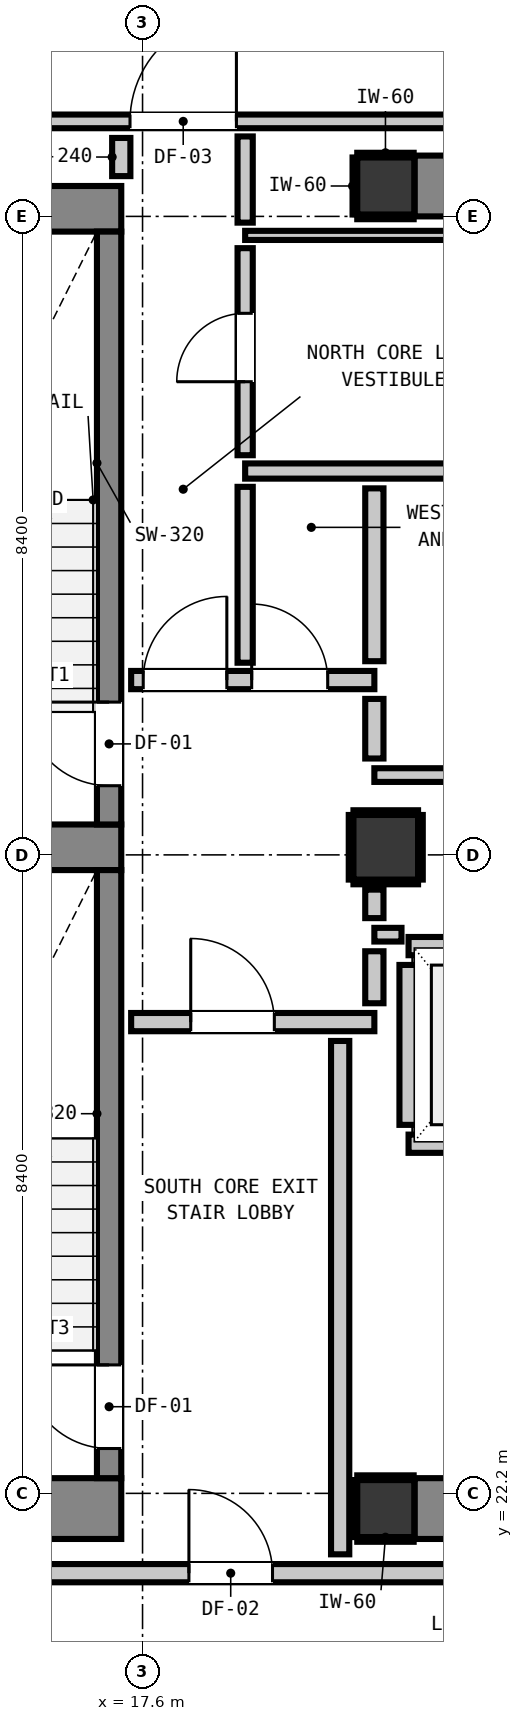
"""IFC4 building model, lengths in metres.
Left out: names, types, materials, properties, quantities, classifications, styles, units other than length and angle.
Written with IfcOpenShell. Run it as: python <this file> out.ifc"""

import sys

from ifc_helpers import new_model, si_unit, direction, frame, frame_2d, origin, origin_2d, place, context, subcontext, project, spatial, rectangle, extrude, element, fill, save


model = new_model("IFC4")
c1 = context("Model", 3, precision=1e-05, world=origin(), true_north=direction((0.0, 1.0)))
c2 = subcontext(c1, "Body", "Model", "MODEL_VIEW")
j1 = project(units=[si_unit("LENGTHUNIT", "METRE"), si_unit("PLANEANGLEUNIT", "RADIAN")], contexts=[c1])
p1 = place(None, origin())
s1 = spatial("IfcSite", under=j1, at=p1, CompositionType="ELEMENT")
p2 = place(p1, origin())
s2 = spatial("IfcBuilding", under=s1, at=p2, CompositionType="ELEMENT")
p3 = place(p2, frame((0.0, 0.0, 206.76)))
s3 = spatial("IfcBuildingStorey", under=s2, at=p3, CompositionType="ELEMENT", Elevation=206.76)
for number, where, z_axis, x_axis in (
    (1, (20.8, 22.0, 0.0), (0.0, 0.0, 1.0), (1.0, 0.0, 0.0)),
    (2, (20.8, 39.4, 0.0), (0.0, 0.0, 1.0), (1.0, 0.0, 0.0)),
):
    element("IfcColumn", number, at=place(p3, frame(where, z_axis=z_axis, x_axis=x_axis)), inside=s3, PredefinedType="COLUMN", context=c2, shape_type="SweptSolid", body=[
        extrude(rectangle(XDim=0.75, YDim=0.75, at=origin_2d()), origin(), (0.0, 0.0, 1.0), 3.32),
    ])
p4 = place(p3, frame((13.24, 22.0, 0.0), z_axis=(0.0, 0.0, 1.0), x_axis=(1.0, 0.0, 0.0)))
e3 = element("IfcWall", 3, at=p4, inside=s3, PredefinedType="SHEAR", context=c2, shape_type="SweptSolid", body=[
    extrude(rectangle(XDim=4.08, YDim=0.8, at=frame_2d((2.04, 0.0))), origin(), (0.0, 0.0, 1.0), 3.32),
])
p5 = place(p3, frame((13.24, 39.1, 0.0), z_axis=(0.0, 0.0, 1.0), x_axis=(1.0, 0.0, 0.0)))
e4 = element("IfcWall", 4, at=p5, inside=s3, PredefinedType="SHEAR", context=c2, shape_type="SweptSolid", body=[
    extrude(rectangle(XDim=4.08, YDim=0.6, at=frame_2d((2.04, 0.0))), origin(), (0.0, 0.0, 1.0), 3.32),
])
p6 = place(p3, frame((13.78, 30.7, 0.0), z_axis=(0.0, 0.0, 1.0), x_axis=(1.0, 0.0, 0.0)))
e5 = element("IfcWall", 5, at=p6, inside=s3, PredefinedType="SHEAR", context=c2, shape_type="SweptSolid", body=[
    extrude(rectangle(XDim=3.54, YDim=0.6, at=frame_2d((1.77, 0.0))), origin(), (0.0, 0.0, 1.0), 3.32),
])
for number, where, z_axis, x_axis in (
    (6, (21.18, 22.0, 0.0), (0.0, 0.0, 1.0), (1.0, 0.0, 0.0)),
    (7, (21.18, 39.4, 0.0), (0.0, 0.0, 1.0), (1.0, 0.0, 0.0)),
):
    element("IfcWall", number, at=place(p3, frame(where, z_axis=z_axis, x_axis=x_axis)), inside=s3, PredefinedType="SHEAR", context=c2, shape_type="SweptSolid", body=[
        extrude(rectangle(XDim=7.64, YDim=0.8, at=frame_2d((3.82, 0.0))), origin(), (0.0, 0.0, 1.0), 3.32),
    ])
p7 = place(p3, frame((17.16, 31.0, 0.0), z_axis=(0.0, 0.0, 1.0), x_axis=(0.0, 1.0, 0.0)))
e8 = element("IfcWall", 8, at=p7, inside=s3, PredefinedType="SHEAR", context=c2, shape_type="SweptSolid", body=[
    extrude(rectangle(XDim=7.8, YDim=0.32, at=frame_2d((3.9, 0.0))), origin(), (0.0, 0.0, 1.0), 3.32),
])
p8 = place(p7, frame((0.51, 0.0, 0.0)))
e9 = element("IfcOpeningElement", 9, at=p8, cuts=e8, PredefinedType="OPENING", context=c2, shape_type="SweptSolid", body=[
    extrude(rectangle(XDim=1.1, YDim=2.15, at=frame_2d((0.55, 1.075))), frame((0.0, 0.17, 0.0), z_axis=(0.0, -1.0, 0.0), x_axis=(1.0, 0.0, 0.0)), (0.0, 0.0, 1.0), 0.34),
])
p9 = place(p3, frame((17.16, 22.4, 0.0), z_axis=(0.0, 0.0, 1.0), x_axis=(0.0, 1.0, 0.0)))
e10 = element("IfcWall", 10, at=p9, inside=s3, PredefinedType="SHEAR", context=c2, shape_type="SweptSolid", body=[
    extrude(rectangle(XDim=8.0, YDim=0.32, at=frame_2d((4.0, 0.0))), origin(), (0.0, 0.0, 1.0), 3.32),
])
p10 = place(p9, frame((0.39, 0.0, 0.0)))
e11 = element("IfcOpeningElement", 11, at=p10, cuts=e10, PredefinedType="OPENING", context=c2, shape_type="SweptSolid", body=[
    extrude(rectangle(XDim=1.1, YDim=2.15, at=frame_2d((0.55, 1.075))), frame((0.0, 0.17, 0.0), z_axis=(0.0, -1.0, 0.0), x_axis=(1.0, 0.0, 0.0)), (0.0, 0.0, 1.0), 0.34),
])
p11 = place(p3, frame((20.8, 30.7, 0.0), z_axis=(0.0, 0.0, 1.0), x_axis=(1.0, 0.0, 0.0)))
e12 = element("IfcColumn", 12, at=p11, inside=s3, PredefinedType="COLUMN", context=c2, shape_type="SweptSolid", body=[
    extrude(rectangle(XDim=0.85, YDim=0.85, at=origin_2d()), origin(), (0.0, 0.0, 1.0), 3.32),
])
for number, where, z_axis, x_axis in (
    (13, (21.1, 26.8, 0.0), (0.0, 0.0, 1.0), (1.0, 0.0, 0.0)),
    (14, (21.1, 29.4, 0.0), (0.0, 0.0, 1.0), (1.0, 0.0, 0.0)),
):
    element("IfcWall", number, at=place(p3, frame(where, z_axis=z_axis, x_axis=x_axis)), inside=s3, PredefinedType="PARTITIONING", context=c2, shape_type="SweptSolid", body=[
        extrude(rectangle(XDim=2.2, YDim=0.24, at=frame_2d((1.1, 0.0))), origin(), (0.0, 0.0, 1.0), 2.9),
    ])
p12 = place(p3, frame((21.1, 27.048, 0.0), z_axis=(0.0, 0.0, 1.0), x_axis=(0.0, 1.0, 0.0)))
e15 = element("IfcWall", 15, at=p12, inside=s3, PredefinedType="PARTITIONING", context=c2, shape_type="SweptSolid", body=[
    extrude(rectangle(XDim=2.104, YDim=0.24, at=frame_2d((1.052, 0.0))), origin(), (0.0, 0.0, 1.0), 0.905),
])
p13 = place(p3, frame((4.587, 21.15, 0.0), z_axis=(0.0, 0.0, 1.0), x_axis=(1.0, 0.0, 0.0)))
e16 = element("IfcWall", 16, at=p13, inside=s3, PredefinedType="PARTITIONING", context=c2, shape_type="SweptSolid", body=[
    extrude(rectangle(XDim=36.626, YDim=0.24, at=frame_2d((18.313, 0.0))), origin(), (0.0, 0.0, 1.0), 2.9),
])
p14 = place(p13, frame((13.623, 0.0, 0.0)))
e17 = element("IfcOpeningElement", 17, at=p14, cuts=e16, PredefinedType="OPENING", context=c2, shape_type="SweptSolid", body=[
    extrude(rectangle(XDim=1.1, YDim=2.15, at=frame_2d((0.55, 1.075))), frame((0.0, 0.13, 0.0), z_axis=(0.0, -1.0, 0.0), x_axis=(1.0, 0.0, 0.0)), (0.0, 0.0, 1.0), 0.26),
])
p15 = place(p13, frame((3.362, 0.0, 0.0)))
e18 = element("IfcOpeningElement", 18, at=p15, cuts=e16, PredefinedType="OPENING", context=c2, shape_type="SweptSolid", body=[
    extrude(rectangle(XDim=0.9, YDim=2.1, at=frame_2d((0.45, 1.05))), frame((0.0, 0.13, 0.0), z_axis=(0.0, -1.0, 0.0), x_axis=(1.0, 0.0, 0.0)), (0.0, 0.0, 1.0), 0.26),
])
p16 = place(p3, frame((17.45, 28.4, 0.0), z_axis=(0.0, 0.0, 1.0), x_axis=(1.0, 0.0, 0.0)))
e19 = element("IfcWall", 19, at=p16, inside=s3, PredefinedType="PARTITIONING", context=c2, shape_type="SweptSolid", body=[
    extrude(rectangle(XDim=3.2, YDim=0.24, at=frame_2d((1.6, 0.0))), origin(), (0.0, 0.0, 1.0), 2.9),
])
p17 = place(p16, frame((0.784, 0.0, 0.0)))
e20 = element("IfcOpeningElement", 20, at=p17, cuts=e19, PredefinedType="OPENING", context=c2, shape_type="SweptSolid", body=[
    extrude(rectangle(XDim=1.1, YDim=2.15, at=frame_2d((0.55, 1.075))), frame((0.0, 0.13, 0.0), z_axis=(0.0, -1.0, 0.0), x_axis=(1.0, 0.0, 0.0)), (0.0, 0.0, 1.0), 0.26),
])
p18 = place(p3, frame((17.45, 32.9, 0.0), z_axis=(0.0, 0.0, 1.0), x_axis=(1.0, 0.0, 0.0)))
e21 = element("IfcWall", 21, at=p18, inside=s3, PredefinedType="PARTITIONING", context=c2, shape_type="SweptSolid", body=[
    extrude(rectangle(XDim=3.2, YDim=0.24, at=frame_2d((1.6, 0.0))), origin(), (0.0, 0.0, 1.0), 2.9),
])
p19 = place(p18, frame((0.159, 0.0, 0.0)))
e22 = element("IfcOpeningElement", 22, at=p19, cuts=e21, PredefinedType="OPENING", context=c2, shape_type="SweptSolid", body=[
    extrude(rectangle(XDim=1.1, YDim=2.15, at=frame_2d((0.55, 1.075))), frame((0.0, 0.13, 0.0), z_axis=(0.0, -1.0, 0.0), x_axis=(1.0, 0.0, 0.0)), (0.0, 0.0, 1.0), 0.26),
])
p20 = place(p18, frame((1.586, 0.0, 0.0)))
e23 = element("IfcOpeningElement", 23, at=p20, cuts=e21, PredefinedType="OPENING", context=c2, shape_type="SweptSolid", body=[
    extrude(rectangle(XDim=1.0, YDim=2.15, at=frame_2d((0.5, 1.075))), frame((0.0, 0.13, 0.0), z_axis=(0.0, -1.0, 0.0), x_axis=(1.0, 0.0, 0.0)), (0.0, 0.0, 1.0), 0.26),
])
p21 = place(p3, frame((18.95, 35.65, 0.0), z_axis=(0.0, 0.0, 1.0), x_axis=(1.0, 0.0, 0.0)))
e24 = element("IfcWall", 24, at=p21, inside=s3, PredefinedType="PARTITIONING", context=c2, shape_type="SweptSolid", body=[
    extrude(rectangle(XDim=11.025, YDim=0.2, at=frame_2d((5.513, 0.0))), origin(), (0.0, 0.0, 1.0), 2.9),
])
p22 = place(p3, frame((20.65, 29.55, 0.0), z_axis=(0.0, 0.0, 1.0), x_axis=(1.0, 0.0, 0.0)))
e25 = element("IfcWall", 25, at=p22, inside=s3, PredefinedType="PARTITIONING", context=c2, shape_type="SweptSolid", body=[
    extrude(rectangle(XDim=0.357, YDim=0.18, at=frame_2d((0.179, 0.0))), origin(), (0.0, 0.0, 1.0), 2.9),
])
p23 = place(p3, frame((20.65, 31.65, 0.0), z_axis=(0.0, 0.0, 1.0), x_axis=(1.0, 0.0, 0.0)))
e26 = element("IfcWall", 26, at=p23, inside=s3, PredefinedType="PARTITIONING", context=c2, shape_type="SweptSolid", body=[
    extrude(rectangle(XDim=7.7, YDim=0.18, at=frame_2d((3.85, 0.0))), origin(), (0.0, 0.0, 1.0), 2.9),
])
p24 = place(p23, frame((4.673, 0.0, 0.0)))
e27 = element("IfcOpeningElement", 27, at=p24, cuts=e26, PredefinedType="OPENING", context=c2, shape_type="SweptSolid", body=[
    extrude(rectangle(XDim=0.9, YDim=2.1, at=frame_2d((0.45, 1.05))), frame((0.0, 0.1, 0.0), z_axis=(0.0, -1.0, 0.0), x_axis=(1.0, 0.0, 0.0)), (0.0, 0.0, 1.0), 0.2),
])
p25 = place(p3, frame((4.587, 40.25, 0.0), z_axis=(0.0, 0.0, 1.0), x_axis=(1.0, 0.0, 0.0)))
e28 = element("IfcWall", 28, at=p25, inside=s3, PredefinedType="PARTITIONING", context=c2, shape_type="SweptSolid", body=[
    extrude(rectangle(XDim=36.626, YDim=0.18, at=frame_2d((18.313, 0.0))), origin(), (0.0, 0.0, 1.0), 2.9),
])
p26 = place(p25, frame((12.848, 0.0, 0.0)))
e29 = element("IfcOpeningElement", 29, at=p26, cuts=e28, PredefinedType="OPENING", context=c2, shape_type="SweptSolid", body=[
    extrude(rectangle(XDim=1.4, YDim=2.15, at=frame_2d((0.7, 1.075))), frame((0.0, 0.1, 0.0), z_axis=(0.0, -1.0, 0.0), x_axis=(1.0, 0.0, 0.0)), (0.0, 0.0, 1.0), 0.2),
])
p27 = place(p25, frame((1.021, 0.0, 0.0)))
e30 = element("IfcOpeningElement", 30, at=p27, cuts=e28, PredefinedType="OPENING", context=c2, shape_type="SweptSolid", body=[
    extrude(rectangle(XDim=0.9, YDim=2.1, at=frame_2d((0.45, 1.05))), frame((0.0, 0.1, 0.0), z_axis=(0.0, -1.0, 0.0), x_axis=(1.0, 0.0, 0.0)), (0.0, 0.0, 1.0), 0.2),
])
p28 = place(p25, frame((4.748, 0.0, 0.0)))
e31 = element("IfcOpeningElement", 31, at=p28, cuts=e28, PredefinedType="OPENING", context=c2, shape_type="SweptSolid", body=[
    extrude(rectangle(XDim=0.95, YDim=2.1, at=frame_2d((0.475, 1.05))), frame((0.0, 0.1, 0.0), z_axis=(0.0, -1.0, 0.0), x_axis=(1.0, 0.0, 0.0)), (0.0, 0.0, 1.0), 0.2),
])
p29 = place(p3, frame((18.95, 38.75, 0.0), z_axis=(0.0, 0.0, 1.0), x_axis=(1.0, 0.0, 0.0)))
e32 = element("IfcWall", 32, at=p29, inside=s3, PredefinedType="PARTITIONING", context=c2, shape_type="SweptSolid", body=[
    extrude(rectangle(XDim=13.56, YDim=0.12, at=frame_2d((6.78, 0.0))), origin(), (0.0, 0.0, 1.0), 0.905),
])
p30 = place(p3, frame((17.32, 39.53, 0.0), z_axis=(0.0, 0.0, 1.0), x_axis=(0.0, 1.0, 0.0)))
e33 = element("IfcWall", 33, at=p30, inside=s3, PredefinedType="PARTITIONING", context=c2, shape_type="SweptSolid", body=[
    extrude(rectangle(XDim=0.502, YDim=0.24, at=frame_2d((0.251, 0.0))), origin(), (0.0, 0.0, 1.0), 2.9),
])
p31 = place(p3, frame((20.2, 21.398, 0.0), z_axis=(0.0, 0.0, 1.0), x_axis=(0.0, 1.0, 0.0)))
e34 = element("IfcWall", 34, at=p31, inside=s3, PredefinedType="PARTITIONING", context=c2, shape_type="SweptSolid", body=[
    extrude(rectangle(XDim=6.754, YDim=0.24, at=frame_2d((3.377, 0.0))), origin(), (0.0, 0.0, 1.0), 0.905),
])
p32 = place(p3, frame((20.65, 28.648, 0.0), z_axis=(0.0, 0.0, 1.0), x_axis=(0.0, 1.0, 0.0)))
e35 = element("IfcWall", 35, at=p32, inside=s3, PredefinedType="PARTITIONING", context=c2, shape_type="SweptSolid", body=[
    extrude(rectangle(XDim=0.684, YDim=0.24, at=frame_2d((0.342, 0.0))), origin(), (0.0, 0.0, 1.0), 0.905),
])
p33 = place(p3, frame((20.65, 29.768, 0.0), z_axis=(0.0, 0.0, 1.0), x_axis=(0.0, 1.0, 0.0)))
e36 = element("IfcWall", 36, at=p33, inside=s3, PredefinedType="PARTITIONING", context=c2, shape_type="SweptSolid", body=[
    extrude(rectangle(XDim=0.375, YDim=0.24, at=frame_2d((0.188, 0.0))), origin(), (0.0, 0.0, 1.0), 0.905),
])
p34 = place(p3, frame((20.65, 31.868, 0.0), z_axis=(0.0, 0.0, 1.0), x_axis=(0.0, 1.0, 0.0)))
e37 = element("IfcWall", 37, at=p34, inside=s3, PredefinedType="PARTITIONING", context=c2, shape_type="SweptSolid", body=[
    extrude(rectangle(XDim=0.784, YDim=0.24, at=frame_2d((0.392, 0.0))), origin(), (0.0, 0.0, 1.0), 0.905),
])
p35 = place(p3, frame((20.65, 33.148, 0.0), z_axis=(0.0, 0.0, 1.0), x_axis=(0.0, 1.0, 0.0)))
e38 = element("IfcWall", 38, at=p35, inside=s3, PredefinedType="PARTITIONING", context=c2, shape_type="SweptSolid", body=[
    extrude(rectangle(XDim=2.274, YDim=0.24, at=frame_2d((1.137, 0.0))), origin(), (0.0, 0.0, 1.0), 0.905),
])
p36 = place(p3, frame((18.95, 33.128, 0.0), z_axis=(0.0, 0.0, 1.0), x_axis=(0.0, 1.0, 0.0)))
e39 = element("IfcWall", 39, at=p36, inside=s3, PredefinedType="PARTITIONING", context=c2, shape_type="SweptSolid", body=[
    extrude(rectangle(XDim=2.314, YDim=0.2, at=frame_2d((1.157, 0.0))), origin(), (0.0, 0.0, 1.0), 2.9),
])
p37 = place(p3, frame((18.95, 35.858, 0.0), z_axis=(0.0, 0.0, 1.0), x_axis=(0.0, 1.0, 0.0)))
e40 = element("IfcWall", 40, at=p37, inside=s3, PredefinedType="PARTITIONING", context=c2, shape_type="SweptSolid", body=[
    extrude(rectangle(XDim=2.724, YDim=0.2, at=frame_2d((1.362, 0.0))), origin(), (0.0, 0.0, 1.0), 2.9),
])
p38 = place(p37, frame((0.967, 0.0, 0.0)))
e41 = element("IfcOpeningElement", 41, at=p38, cuts=e40, PredefinedType="OPENING", context=c2, shape_type="SweptSolid", body=[
    extrude(rectangle(XDim=0.9, YDim=2.1, at=frame_2d((0.45, 1.05))), frame((0.0, 0.11, 0.0), z_axis=(0.0, -1.0, 0.0), x_axis=(1.0, 0.0, 0.0)), (0.0, 0.0, 1.0), 0.22),
])
p39 = place(p3, frame((18.95, 38.918, 0.0), z_axis=(0.0, 0.0, 1.0), x_axis=(0.0, 1.0, 0.0)))
e42 = element("IfcWall", 42, at=p39, inside=s3, PredefinedType="PARTITIONING", context=c2, shape_type="SweptSolid", body=[
    extrude(rectangle(XDim=1.134, YDim=0.2, at=frame_2d((0.567, 0.0))), origin(), (0.0, 0.0, 1.0), 2.9),
])
for number, where, z_axis, x_axis in (
    (43, (20.425, 21.593, 0.0), (0.0, 0.0, 1.0), (1.0, 0.0, 0.0)),
    (44, (20.425, 22.407, 0.0), (0.0, 0.0, 1.0), (1.0, 0.0, 0.0)),
):
    element("IfcWall", number, at=place(p3, frame(where, z_axis=z_axis, x_axis=x_axis)), inside=s3, PredefinedType="PARTITIONING", context=c2, shape_type="SweptSolid", body=[
        extrude(rectangle(XDim=0.742, YDim=0.06, at=frame_2d((0.371, 0.0))), origin(), (0.0, 0.0, 1.0), 0.905),
    ])
p40 = place(p3, frame((20.393, 21.625, 0.0), z_axis=(0.0, 0.0, 1.0), x_axis=(0.0, 1.0, 0.0)))
e45 = element("IfcWall", 45, at=p40, inside=s3, PredefinedType="PARTITIONING", context=c2, shape_type="SweptSolid", body=[
    extrude(rectangle(XDim=0.75, YDim=0.06, at=frame_2d((0.375, 0.0))), origin(), (0.0, 0.0, 1.0), 0.905),
])
for number, where, z_axis, x_axis in (
    (46, (20.425, 38.993, 0.0), (0.0, 0.0, 1.0), (1.0, 0.0, 0.0)),
    (47, (20.425, 39.807, 0.0), (0.0, 0.0, 1.0), (1.0, 0.0, 0.0)),
):
    element("IfcWall", number, at=place(p3, frame(where, z_axis=z_axis, x_axis=x_axis)), inside=s3, PredefinedType="PARTITIONING", context=c2, shape_type="SweptSolid", body=[
        extrude(rectangle(XDim=0.742, YDim=0.06, at=frame_2d((0.371, 0.0))), origin(), (0.0, 0.0, 1.0), 0.905),
    ])
p41 = place(p3, frame((20.393, 39.025, 0.0), z_axis=(0.0, 0.0, 1.0), x_axis=(0.0, 1.0, 0.0)))
e48 = element("IfcWall", 48, at=p41, inside=s3, PredefinedType="PARTITIONING", context=c2, shape_type="SweptSolid", body=[
    extrude(rectangle(XDim=0.75, YDim=0.06, at=frame_2d((0.375, 0.0))), origin(), (0.0, 0.0, 1.0), 0.905),
])
for number, where, z_axis, x_axis in (
    (49, (20.375, 30.243, 0.0), (0.0, 0.0, 1.0), (1.0, 0.0, 0.0)),
    (50, (20.375, 31.157, 0.0), (0.0, 0.0, 1.0), (1.0, 0.0, 0.0)),
    (51, (20.343, 30.275, 0.0), (0.0, 0.0, 1.0), (0.0, 1.0, 0.0)),
    (52, (21.257, 30.275, 0.0), (0.0, 0.0, 1.0), (0.0, 1.0, 0.0)),
):
    element("IfcWall", number, at=place(p3, frame(where, z_axis=z_axis, x_axis=x_axis)), inside=s3, PredefinedType="PARTITIONING", context=c2, shape_type="SweptSolid", body=[
        extrude(rectangle(XDim=0.85, YDim=0.06, at=frame_2d((0.425, 0.0))), origin(), (0.0, 0.0, 1.0), 0.905),
    ])
p42 = place(p8, origin())
e53 = element("IfcDoor", 53, at=p42, inside=s3, OperationType="SINGLE_SWING_RIGHT", PredefinedType="DOOR", context=c2, shape_type="SweptSolid", body=[
    extrude(rectangle(XDim=1.1, YDim=2.15, at=frame_2d((0.55, 1.075))), frame((0.0, 0.025, 0.0), z_axis=(0.0, -1.0, 0.0), x_axis=(1.0, 0.0, 0.0)), (0.0, 0.0, 1.0), 0.05),
])
fill(e9, e53)
p43 = place(p10, origin())
e54 = element("IfcDoor", 54, at=p43, inside=s3, OperationType="SINGLE_SWING_RIGHT", PredefinedType="DOOR", context=c2, shape_type="SweptSolid", body=[
    extrude(rectangle(XDim=1.1, YDim=2.15, at=frame_2d((0.55, 1.075))), frame((0.0, 0.025, 0.0), z_axis=(0.0, -1.0, 0.0), x_axis=(1.0, 0.0, 0.0)), (0.0, 0.0, 1.0), 0.05),
])
fill(e11, e54)
p44 = place(p17, origin())
e55 = element("IfcDoor", 55, at=p44, inside=s3, OperationType="SINGLE_SWING_LEFT", PredefinedType="DOOR", context=c2, shape_type="SweptSolid", body=[
    extrude(rectangle(XDim=1.1, YDim=2.15, at=frame_2d((0.55, 1.075))), frame((0.0, 0.025, 0.0), z_axis=(0.0, -1.0, 0.0), x_axis=(1.0, 0.0, 0.0)), (0.0, 0.0, 1.0), 0.05),
])
fill(e20, e55)
p45 = place(p19, origin())
e56 = element("IfcDoor", 56, at=p45, inside=s3, OperationType="SINGLE_SWING_RIGHT", PredefinedType="DOOR", context=c2, shape_type="SweptSolid", body=[
    extrude(rectangle(XDim=1.1, YDim=2.15, at=frame_2d((0.55, 1.075))), frame((0.0, 0.025, 0.0), z_axis=(0.0, -1.0, 0.0), x_axis=(1.0, 0.0, 0.0)), (0.0, 0.0, 1.0), 0.05),
])
fill(e22, e56)
p46 = place(p14, origin())
e57 = element("IfcDoor", 57, at=p46, inside=s3, OperationType="SINGLE_SWING_LEFT", PredefinedType="DOOR", context=c2, shape_type="SweptSolid", body=[
    extrude(rectangle(XDim=1.1, YDim=2.15, at=frame_2d((0.55, 1.075))), frame((0.0, 0.025, 0.0), z_axis=(0.0, -1.0, 0.0), x_axis=(1.0, 0.0, 0.0)), (0.0, 0.0, 1.0), 0.05),
])
fill(e17, e57)
p47 = place(p26, origin())
e58 = element("IfcDoor", 58, at=p47, inside=s3, OperationType="SINGLE_SWING_RIGHT", PredefinedType="DOOR", context=c2, shape_type="SweptSolid", body=[
    extrude(rectangle(XDim=1.4, YDim=2.15, at=frame_2d((0.7, 1.075))), frame((0.0, 0.025, 0.0), z_axis=(0.0, -1.0, 0.0), x_axis=(1.0, 0.0, 0.0)), (0.0, 0.0, 1.0), 0.05),
])
fill(e29, e58)
p48 = place(p20, origin())
e59 = element("IfcDoor", 59, at=p48, inside=s3, OperationType="SINGLE_SWING_LEFT", PredefinedType="DOOR", context=c2, shape_type="SweptSolid", body=[
    extrude(rectangle(XDim=1.0, YDim=2.15, at=frame_2d((0.5, 1.075))), frame((0.0, 0.025, 0.0), z_axis=(0.0, -1.0, 0.0), x_axis=(1.0, 0.0, 0.0)), (0.0, 0.0, 1.0), 0.05),
])
fill(e23, e59)
p49 = place(p38, origin())
e60 = element("IfcDoor", 60, at=p49, inside=s3, OperationType="SINGLE_SWING_LEFT", PredefinedType="DOOR", context=c2, shape_type="SweptSolid", body=[
    extrude(rectangle(XDim=0.9, YDim=2.1, at=frame_2d((0.45, 1.05))), frame((0.0, 0.025, 0.0), z_axis=(0.0, -1.0, 0.0), x_axis=(1.0, 0.0, 0.0)), (0.0, 0.0, 1.0), 0.05),
])
fill(e41, e60)
save(model, sys.argv[1])
